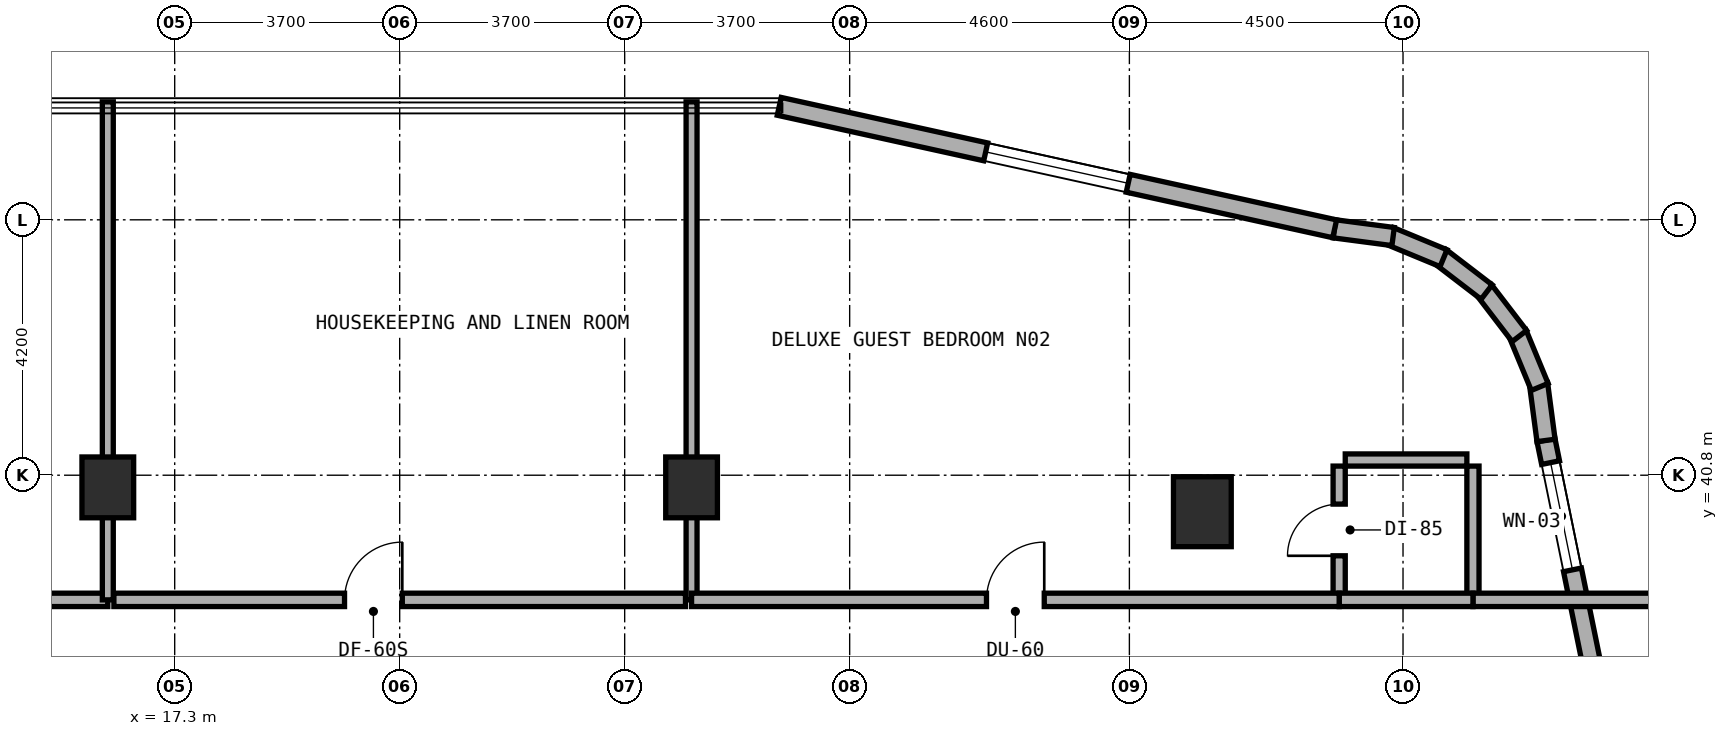
"""IFC4 building model, lengths in metres.
Left out: names, types, materials, properties, quantities, classifications, styles, units other than length and angle.
Written with IfcOpenShell. Run it as: python <this file> out.ifc"""

import sys

from ifc_helpers import new_model, si_unit, direction, frame, frame_2d, origin, origin_2d, place, context, subcontext, project, spatial, rectangle, extrude, element, fill, save


model = new_model("IFC4")
c1 = context("Model", 3, precision=1e-05, world=origin(), true_north=direction((0.0, 1.0)))
c2 = subcontext(c1, "Body", "Model", "MODEL_VIEW")
j1 = project(units=[si_unit("LENGTHUNIT", "METRE"), si_unit("PLANEANGLEUNIT", "RADIAN")], contexts=[c1])
p1 = place(None, origin())
s1 = spatial("IfcSite", under=j1, at=p1, CompositionType="ELEMENT")
p2 = place(p1, origin())
s2 = spatial("IfcBuilding", under=s1, at=p2, CompositionType="ELEMENT")
p3 = place(p2, frame((0.0, 0.0, 83.5)))
s3 = spatial("IfcBuildingStorey", under=s2, at=p3, CompositionType="ELEMENT", Elevation=83.5)
for number, where, z_axis, x_axis in (
    (1, (16.2, 40.6, 0.0), (0.0, 0.0, 1.0), (1.0, 0.0, 0.0)),
    (2, (25.8, 40.6, 0.0), (0.0, 0.0, 1.0), (1.0, 0.0, 0.0)),
):
    element("IfcColumn", number, at=place(p3, frame(where, z_axis=z_axis, x_axis=x_axis)), inside=s3, PredefinedType="COLUMN", context=c2, shape_type="SweptSolid", body=[
        extrude(rectangle(XDim=0.85, YDim=1.0, at=origin_2d()), origin(), (0.0, 0.0, 1.0), 3.5),
    ])
p4 = place(p3, frame((34.2, 40.2, 0.0), z_axis=(0.0, 0.0, 1.0), x_axis=(1.0, 0.0, 0.0)))
e3 = element("IfcColumn", 3, at=p4, inside=s3, PredefinedType="COLUMN", context=c2, shape_type="SweptSolid", body=[
    extrude(rectangle(XDim=0.95, YDim=1.15, at=origin_2d()), origin(), (0.0, 0.0, 1.0), 3.5),
])
p5 = place(p3, frame((41.864, 31.516, 0.0), z_axis=(0.0, 0.0, 1.0), x_axis=(-0.199990901713, 0.979797754249, 0.0)))
e4 = element("IfcWall", 4, at=p5, inside=s3, PredefinedType="STANDARD", context=c2, shape_type="SweptSolid", body=[
    extrude(rectangle(XDim=10.065, YDim=0.3, at=frame_2d((5.033, 0.0))), origin(), (0.0, 0.0, 1.0), 3.22),
])
p6 = place(p5, frame((2.429, 0.0, 0.8)))
e5 = element("IfcOpeningElement", 5, at=p6, cuts=e4, PredefinedType="OPENING", context=c2, shape_type="SweptSolid", body=[
    extrude(rectangle(XDim=2.4, YDim=1.6, at=frame_2d((1.2, 0.8))), frame((0.0, 0.16, 0.0), z_axis=(0.0, -1.0, 0.0), x_axis=(1.0, 0.0, 0.0)), (0.0, 0.0, 1.0), 0.32),
])
p7 = place(p5, frame((7.887, 0.0, 0.85)))
e6 = element("IfcOpeningElement", 6, at=p7, cuts=e4, PredefinedType="OPENING", context=c2, shape_type="SweptSolid", body=[
    extrude(rectangle(XDim=1.8, YDim=1.5, at=frame_2d((0.9, 0.75))), frame((0.0, 0.16, 0.0), z_axis=(0.0, -1.0, 0.0), x_axis=(1.0, 0.0, 0.0)), (0.0, 0.0, 1.0), 0.32),
])
p8 = place(p3, frame((39.852, 41.372, 0.0), z_axis=(0.0, 0.0, 1.0), x_axis=(-0.131174864804, 0.991359246108, 0.0)))
e7 = element("IfcWall", 7, at=p8, inside=s3, PredefinedType="STANDARD", context=c2, shape_type="SweptSolid", body=[
    extrude(rectangle(XDim=0.938, YDim=0.3, at=frame_2d((0.469, 0.0))), origin(), (0.0, 0.0, 1.0), 3.22),
])
p9 = place(p3, frame((39.748, 42.252, 0.0), z_axis=(0.0, 0.0, 1.0), x_axis=(-0.382344263057, 0.924019948111, 0.0)))
e8 = element("IfcWall", 8, at=p9, inside=s3, PredefinedType="STANDARD", context=c2, shape_type="SweptSolid", body=[
    extrude(rectangle(XDim=0.955, YDim=0.3, at=frame_2d((0.477, 0.0))), origin(), (0.0, 0.0, 1.0), 3.22),
])
p10 = place(p3, frame((39.414, 43.089, 0.0), z_axis=(0.0, 0.0, 1.0), x_axis=(-0.608474481025, 0.793573440799, 0.0)))
e9 = element("IfcWall", 9, at=p10, inside=s3, PredefinedType="STANDARD", context=c2, shape_type="SweptSolid", body=[
    extrude(rectangle(XDim=0.955, YDim=0.3, at=frame_2d((0.478, 0.0))), origin(), (0.0, 0.0, 1.0), 3.22),
])
p11 = place(p3, frame((38.875, 43.812, 0.0), z_axis=(0.0, 0.0, 1.0), x_axis=(-0.793668068435, 0.608351047625, 0.0)))
e10 = element("IfcWall", 10, at=p11, inside=s3, PredefinedType="STANDARD", context=c2, shape_type="SweptSolid", body=[
    extrude(rectangle(XDim=0.955, YDim=0.3, at=frame_2d((0.478, 0.0))), origin(), (0.0, 0.0, 1.0), 3.22),
])
p12 = place(p3, frame((38.166, 44.369, 0.0), z_axis=(0.0, 0.0, 1.0), x_axis=(-0.924019948111, 0.382344263057, 0.0)))
e11 = element("IfcWall", 11, at=p12, inside=s3, PredefinedType="STANDARD", context=c2, shape_type="SweptSolid", body=[
    extrude(rectangle(XDim=0.955, YDim=0.3, at=frame_2d((0.477, 0.0))), origin(), (0.0, 0.0, 1.0), 3.22),
])
p13 = place(p3, frame((37.337, 44.725, 0.0), z_axis=(0.0, 0.0, 1.0), x_axis=(-0.991454295543, 0.130454512571, 0.0)))
e12 = element("IfcWall", 12, at=p13, inside=s3, PredefinedType="STANDARD", context=c2, shape_type="SweptSolid", body=[
    extrude(rectangle(XDim=0.973, YDim=0.3, at=frame_2d((0.487, 0.0))), origin(), (0.0, 0.0, 1.0), 3.22),
])
p14 = place(p3, frame((36.376, 44.852, 0.0), z_axis=(0.0, 0.0, 1.0), x_axis=(-0.97654500432, 0.215313386808, 0.0)))
e13 = element("IfcWall", 13, at=p14, inside=s3, PredefinedType="STANDARD", context=c2, shape_type="SweptSolid", body=[
    extrude(rectangle(XDim=9.354, YDim=0.3, at=frame_2d((4.677, 0.0))), origin(), (0.0, 0.0, 1.0), 3.22),
])
p15 = place(p14, frame((3.477, 0.0, 0.8)))
e14 = element("IfcOpeningElement", 14, at=p15, cuts=e13, PredefinedType="OPENING", context=c2, shape_type="SweptSolid", body=[
    extrude(rectangle(XDim=2.4, YDim=1.6, at=frame_2d((1.2, 0.8))), frame((0.0, 0.16, 0.0), z_axis=(0.0, -1.0, 0.0), x_axis=(1.0, 0.0, 0.0)), (0.0, 0.0, 1.0), 0.32),
])
p16 = place(p3, frame((5.55, 38.75, 0.0), z_axis=(0.0, 0.0, 1.0), x_axis=(1.0, 0.0, 0.0)))
e15 = element("IfcWall", 15, at=p16, inside=s3, PredefinedType="SOLIDWALL", context=c2, shape_type="SweptSolid", body=[
    extrude(rectangle(XDim=10.65, YDim=0.22, at=frame_2d((5.325, 0.0))), origin(), (0.0, 0.0, 1.0), 2.595),
])
p17 = place(p16, frame((4.85, 0.0, 0.0)))
e16 = element("IfcOpeningElement", 16, at=p17, cuts=e15, PredefinedType="OPENING", context=c2, shape_type="SweptSolid", body=[
    extrude(rectangle(XDim=0.95, YDim=2.1, at=frame_2d((0.475, 1.05))), frame((0.0, 0.12, 0.0), z_axis=(0.0, -1.0, 0.0), x_axis=(1.0, 0.0, 0.0)), (0.0, 0.0, 1.0), 0.24),
])
p18 = place(p3, frame((16.2, 38.75, 0.0), z_axis=(0.0, 0.0, 1.0), x_axis=(0.0, 1.0, 0.0)))
e17 = element("IfcWall", 17, at=p18, inside=s3, PredefinedType="SOLIDWALL", context=c2, shape_type="SweptSolid", body=[
    extrude(rectangle(XDim=8.19, YDim=0.18, at=frame_2d((4.095, 0.0))), origin(), (0.0, 0.0, 1.0), 2.595),
])
p19 = place(p3, frame((16.3, 38.75, 0.0), z_axis=(0.0, 0.0, 1.0), x_axis=(1.0, 0.0, 0.0)))
e18 = element("IfcWall", 18, at=p19, inside=s3, PredefinedType="SOLIDWALL", context=c2, shape_type="SweptSolid", body=[
    extrude(rectangle(XDim=9.4, YDim=0.22, at=frame_2d((4.7, 0.0))), origin(), (0.0, 0.0, 1.0), 2.835),
])
p20 = place(p19, frame((3.793, 0.0, 0.0)))
e19 = element("IfcOpeningElement", 19, at=p20, cuts=e18, PredefinedType="OPENING", context=c2, shape_type="SweptSolid", body=[
    extrude(rectangle(XDim=0.95, YDim=2.1, at=frame_2d((0.475, 1.05))), frame((0.0, 0.12, 0.0), z_axis=(0.0, -1.0, 0.0), x_axis=(1.0, 0.0, 0.0)), (0.0, 0.0, 1.0), 0.24),
])
p21 = place(p3, frame((25.8, 38.75, 0.0), z_axis=(0.0, 0.0, 1.0), x_axis=(0.0, 1.0, 0.0)))
e20 = element("IfcWall", 20, at=p21, inside=s3, PredefinedType="SOLIDWALL", context=c2, shape_type="SweptSolid", body=[
    extrude(rectangle(XDim=8.19, YDim=0.18, at=frame_2d((4.095, 0.0))), origin(), (0.0, 0.0, 1.0), 2.595),
])
p22 = place(p3, frame((36.45, 38.85, 0.0), z_axis=(0.0, 0.0, 1.0), x_axis=(0.0, 1.0, 0.0)))
e21 = element("IfcWall", 21, at=p22, inside=s3, PredefinedType="PLUMBINGWALL", context=c2, shape_type="SweptSolid", body=[
    extrude(rectangle(XDim=2.1, YDim=0.2, at=frame_2d((1.05, 0.0))), origin(), (0.0, 0.0, 1.0), 3.22),
])
p23 = place(p22, frame((0.625, 0.0, 0.0)))
e22 = element("IfcOpeningElement", 22, at=p23, cuts=e21, PredefinedType="OPENING", context=c2, shape_type="SweptSolid", body=[
    extrude(rectangle(XDim=0.85, YDim=2.1, at=frame_2d((0.425, 1.05))), frame((0.0, 0.11, 0.0), z_axis=(0.0, -1.0, 0.0), x_axis=(1.0, 0.0, 0.0)), (0.0, 0.0, 1.0), 0.22),
])
p24 = place(p3, frame((36.55, 41.05, 0.0), z_axis=(0.0, 0.0, 1.0), x_axis=(1.0, 0.0, 0.0)))
e23 = element("IfcWall", 23, at=p24, inside=s3, PredefinedType="PLUMBINGWALL", context=c2, shape_type="SweptSolid", body=[
    extrude(rectangle(XDim=2.0, YDim=0.2, at=frame_2d((1.0, 0.0))), origin(), (0.0, 0.0, 1.0), 3.22),
])
p25 = place(p3, frame((38.65, 38.85, 0.0), z_axis=(0.0, 0.0, 1.0), x_axis=(0.0, 1.0, 0.0)))
e24 = element("IfcWall", 24, at=p25, inside=s3, PredefinedType="PLUMBINGWALL", context=c2, shape_type="SweptSolid", body=[
    extrude(rectangle(XDim=2.1, YDim=0.2, at=frame_2d((1.05, 0.0))), origin(), (0.0, 0.0, 1.0), 3.22),
])
p26 = place(p3, frame((38.65, 38.75, 0.0), z_axis=(0.0, 0.0, 1.0), x_axis=(1.0, 0.0, 0.0)))
e25 = element("IfcWall", 25, at=p26, inside=s3, PredefinedType="SOLIDWALL", context=c2, shape_type="SweptSolid", body=[
    extrude(rectangle(XDim=3.19, YDim=0.22, at=frame_2d((1.595, 0.0))), origin(), (0.0, 0.0, 1.0), 3.22),
])
p27 = place(p3, frame((36.45, 38.75, 0.0), z_axis=(0.0, 0.0, 1.0), x_axis=(1.0, 0.0, 0.0)))
e26 = element("IfcWall", 26, at=p27, inside=s3, PredefinedType="SOLIDWALL", context=c2, shape_type="SweptSolid", body=[
    extrude(rectangle(XDim=2.2, YDim=0.22, at=frame_2d((1.1, 0.0))), origin(), (0.0, 0.0, 1.0), 3.22),
])
p28 = place(p3, frame((25.8, 38.75, 0.0), z_axis=(0.0, 0.0, 1.0), x_axis=(1.0, 0.0, 0.0)))
e27 = element("IfcWall", 27, at=p28, inside=s3, PredefinedType="SOLIDWALL", context=c2, shape_type="SweptSolid", body=[
    extrude(rectangle(XDim=10.65, YDim=0.22, at=frame_2d((5.325, 0.0))), origin(), (0.0, 0.0, 1.0), 2.595),
])
p29 = place(p28, frame((4.85, 0.0, 0.0)))
e28 = element("IfcOpeningElement", 28, at=p29, cuts=e27, PredefinedType="OPENING", context=c2, shape_type="SweptSolid", body=[
    extrude(rectangle(XDim=0.95, YDim=2.1, at=frame_2d((0.475, 1.05))), frame((0.0, 0.12, 0.0), z_axis=(0.0, -1.0, 0.0), x_axis=(1.0, 0.0, 0.0)), (0.0, 0.0, 1.0), 0.24),
])
p30 = place(p7, origin())
e29 = element("IfcWindow", 29, at=p30, inside=s3, PartitioningType="SINGLE_PANEL", PredefinedType="WINDOW", context=c2, shape_type="SweptSolid", body=[
    extrude(rectangle(XDim=1.8, YDim=1.5, at=frame_2d((0.9, 0.75))), frame((0.0, 0.03, 0.0), z_axis=(0.0, -1.0, 0.0), x_axis=(1.0, 0.0, 0.0)), (0.0, 0.0, 1.0), 0.06),
])
fill(e6, e29)
p31 = place(p15, origin())
e30 = element("IfcWindow", 30, at=p31, inside=s3, PartitioningType="SINGLE_PANEL", PredefinedType="WINDOW", context=c2, shape_type="SweptSolid", body=[
    extrude(rectangle(XDim=2.4, YDim=1.6, at=frame_2d((1.2, 0.8))), frame((0.0, 0.03, 0.0), z_axis=(0.0, -1.0, 0.0), x_axis=(1.0, 0.0, 0.0)), (0.0, 0.0, 1.0), 0.06),
])
fill(e14, e30)
p32 = place(p20, origin())
e31 = element("IfcDoor", 31, at=p32, inside=s3, OperationType="SINGLE_SWING_RIGHT", PredefinedType="DOOR", context=c2, shape_type="SweptSolid", body=[
    extrude(rectangle(XDim=0.95, YDim=2.1, at=frame_2d((0.475, 1.05))), frame((0.0, 0.025, 0.0), z_axis=(0.0, -1.0, 0.0), x_axis=(1.0, 0.0, 0.0)), (0.0, 0.0, 1.0), 0.05),
])
fill(e19, e31)
p33 = place(p23, origin())
e32 = element("IfcDoor", 32, at=p33, inside=s3, OperationType="SINGLE_SWING_LEFT", PredefinedType="DOOR", context=c2, shape_type="SweptSolid", body=[
    extrude(rectangle(XDim=0.85, YDim=2.1, at=frame_2d((0.425, 1.05))), frame((0.0, 0.025, 0.0), z_axis=(0.0, -1.0, 0.0), x_axis=(1.0, 0.0, 0.0)), (0.0, 0.0, 1.0), 0.05),
])
fill(e22, e32)
p34 = place(p29, origin())
e33 = element("IfcDoor", 33, at=p34, inside=s3, OperationType="SINGLE_SWING_RIGHT", PredefinedType="DOOR", context=c2, shape_type="SweptSolid", body=[
    extrude(rectangle(XDim=0.95, YDim=2.1, at=frame_2d((0.475, 1.05))), frame((0.0, 0.025, 0.0), z_axis=(0.0, -1.0, 0.0), x_axis=(1.0, 0.0, 0.0)), (0.0, 0.0, 1.0), 0.05),
])
fill(e28, e33)
save(model, sys.argv[1])
